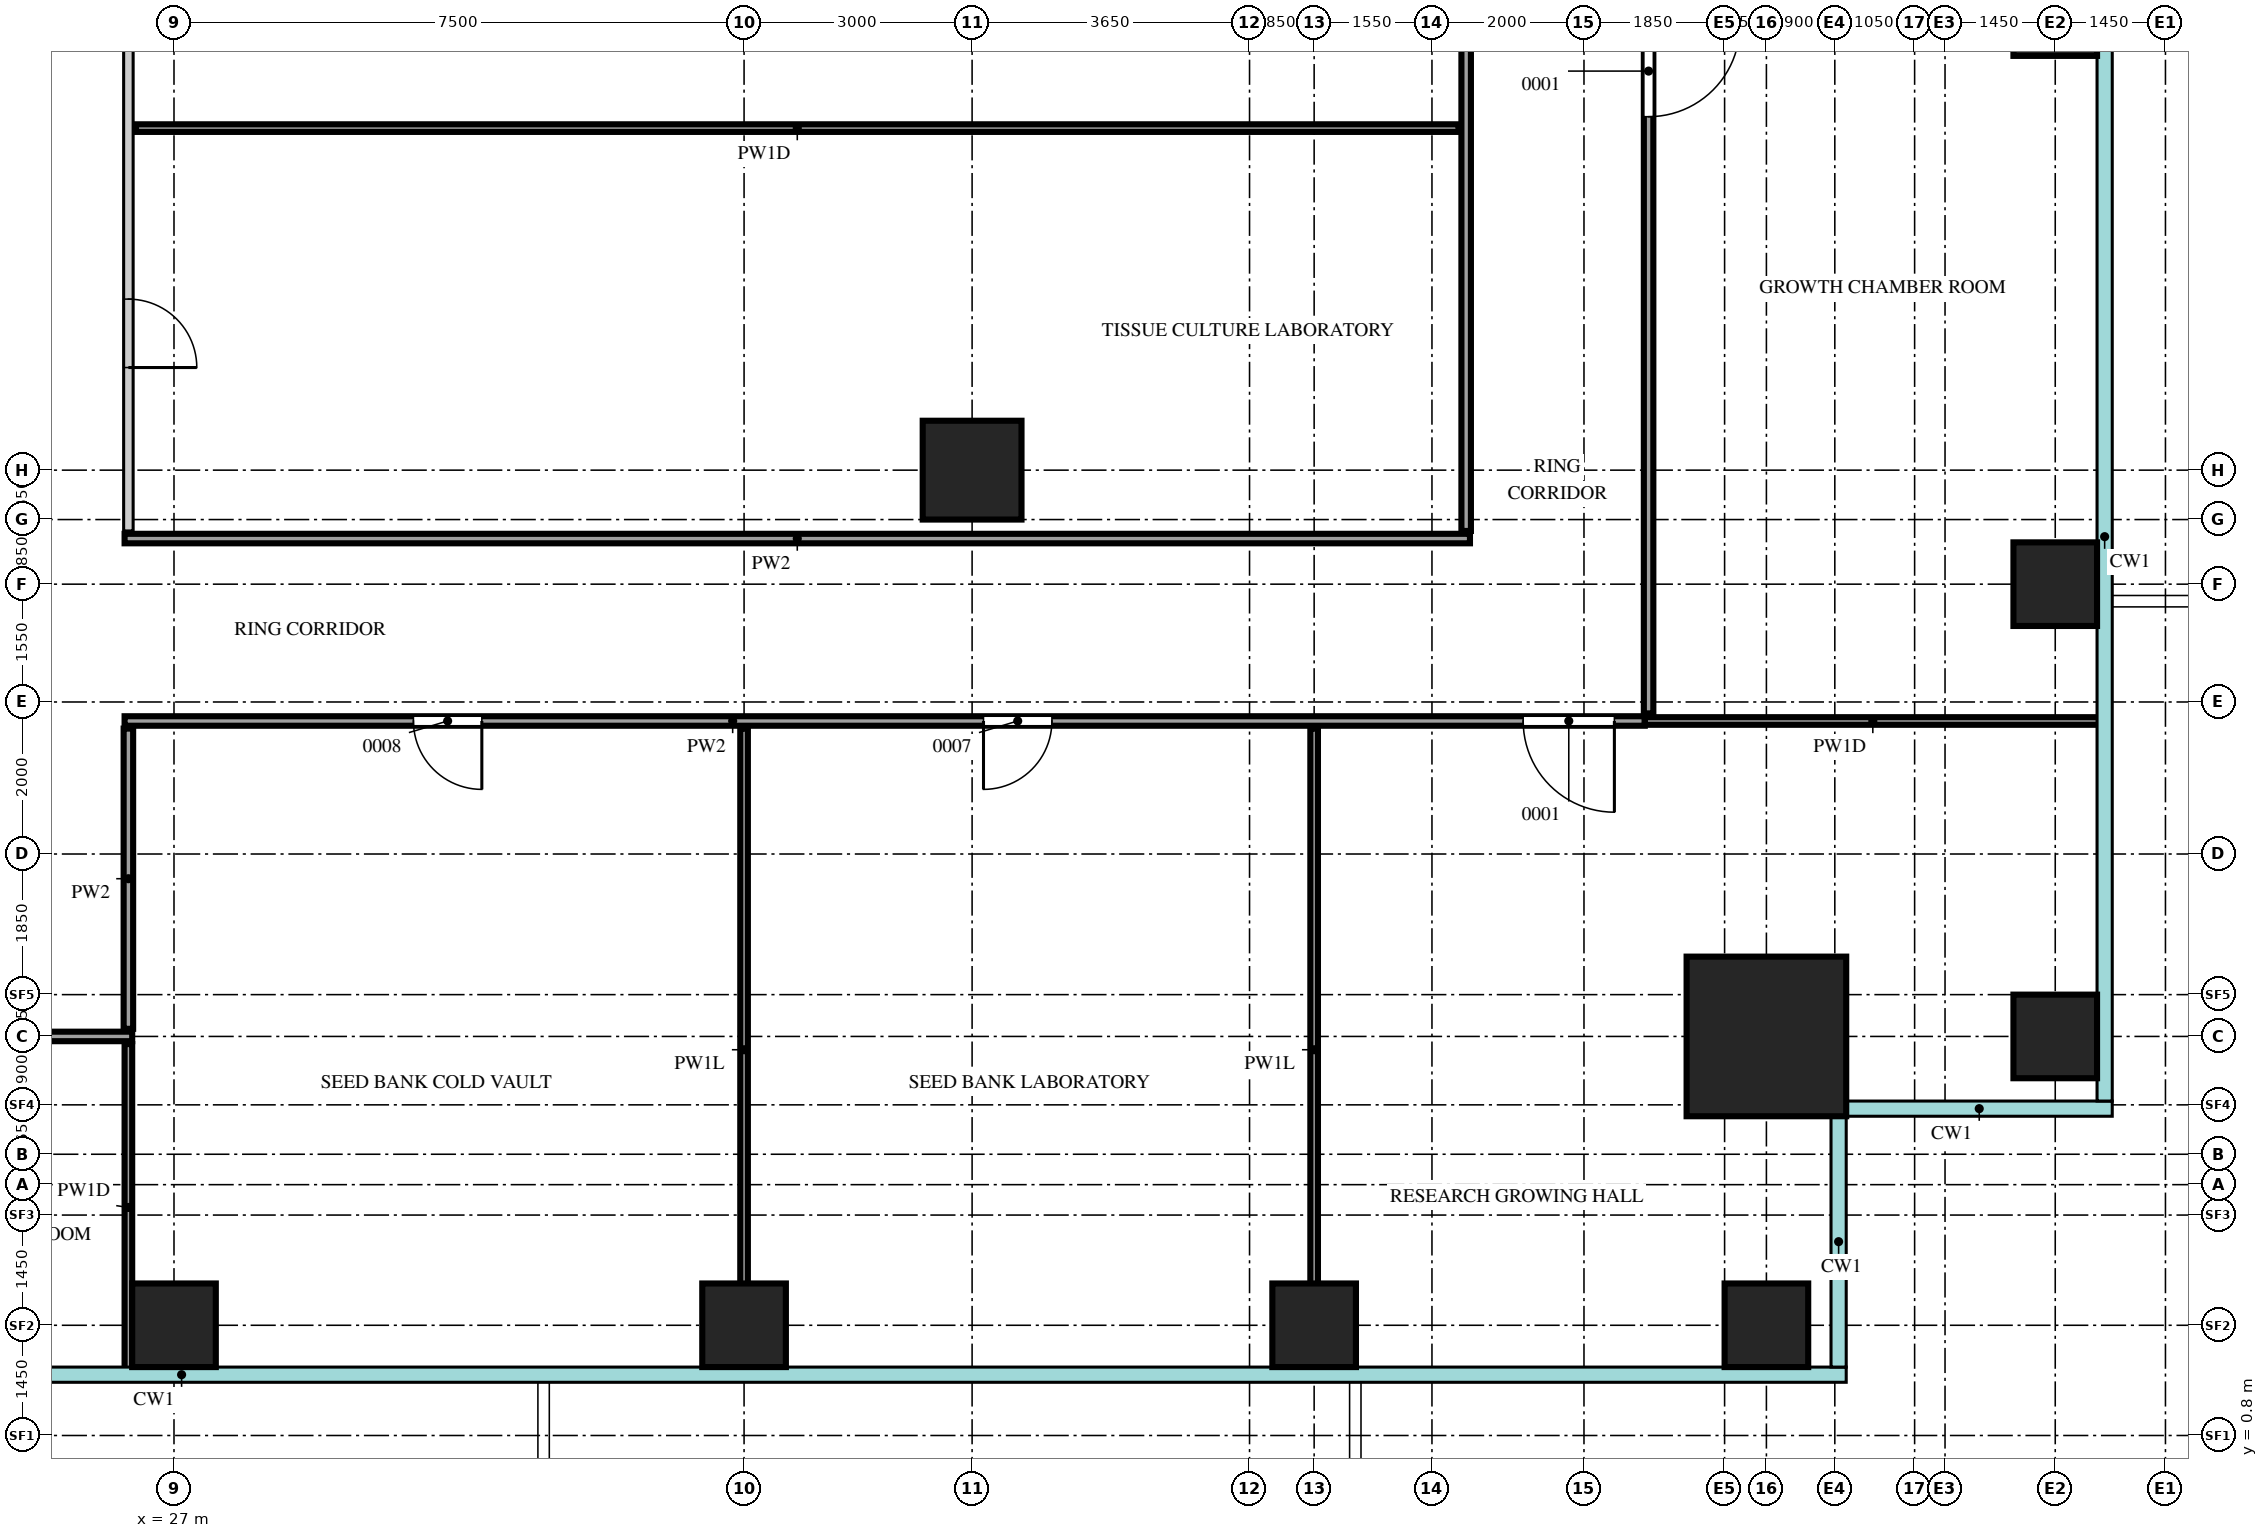
"""IFC4 building model, lengths in metres.
Left out: names, types, materials, properties, quantities, classifications, styles, units other than length and angle.
Written with IfcOpenShell. Run it as: python <this file> out.ifc"""

import sys

from ifc_helpers import new_model, si_unit, direction, frame, frame_2d, origin, origin_2d, place, context, subcontext, project, spatial, rectangle, extrude, source, transform, mapped, element, fill, save


model = new_model("IFC4")
c1 = context("Model", 3, precision=1e-05, world=origin(), true_north=direction((0.0, 1.0)))
c2 = subcontext(c1, "Body", "Model", "MODEL_VIEW")
j1 = project(units=[si_unit("LENGTHUNIT", "METRE"), si_unit("PLANEANGLEUNIT", "RADIAN")], contexts=[c1])
p1 = place(None, origin())
s1 = spatial("IfcSite", under=j1, at=p1, CompositionType="ELEMENT")
p2 = place(p1, origin())
s2 = spatial("IfcBuilding", under=s1, at=p2, CompositionType="ELEMENT")
p3 = place(p2, frame((0.0, 0.0, 105.9)))
s3 = spatial("IfcBuildingStorey", under=s2, at=p3, CompositionType="ELEMENT", Elevation=105.9)
m1 = source(origin(), c2, "Body", "SweptSolid", [
    extrude(rectangle(XDim=2.1, YDim=2.1, at=origin_2d()), origin(), (0.0, 0.0, 1.0), 4.4),
])
p4 = place(p3, frame((47.95, 6.05, 0.0), z_axis=(0.0, 0.0, 1.0), x_axis=(1.0, 0.0, 0.0)))
e1 = element("IfcColumn", 1, at=p4, inside=s3, PredefinedType="COLUMN", context=c2, shape_type="MappedRepresentation", body=[
    mapped(m1, transform((0.0, 0.0, 0.0))),
])
m2 = source(origin(), c2, "Body", "SweptSolid", [
    extrude(rectangle(XDim=1.1, YDim=1.1, at=origin_2d()), origin(), (0.0, 0.0, 1.0), 4.1),
])
for number, where, z_axis, x_axis in (
    (2, (27.0, 2.25, 0.0), (0.0, 0.0, 1.0), (1.0, 0.0, 0.0)),
    (3, (34.5, 2.25, 0.0), (0.0, 0.0, 1.0), (1.0, 0.0, 0.0)),
    (4, (42.0, 2.25, 0.0), (0.0, 0.0, 1.0), (1.0, 0.0, 0.0)),
    (5, (47.95, 2.25, 0.0), (0.0, 0.0, 1.0), (1.0, 0.0, 0.0)),
    (6, (51.75, 6.05, 0.0), (0.0, 0.0, 1.0), (1.0, 0.0, 0.0)),
    (7, (51.75, 12.0, 0.0), (0.0, 0.0, 1.0), (1.0, 0.0, 0.0)),
    (8, (51.75, 19.5, 0.0), (0.0, 0.0, 1.0), (1.0, 0.0, 0.0)),
):
    element("IfcColumn", number, at=place(p3, frame(where, z_axis=z_axis, x_axis=x_axis)), inside=s3, PredefinedType="COLUMN", context=c2, shape_type="MappedRepresentation", body=[
        mapped(m2, transform((0.0, 0.0, 0.0))),
    ])
m3 = source(origin(), c2, "Body", "SweptSolid", [
    extrude(rectangle(XDim=1.3, YDim=1.3, at=origin_2d()), origin(), (0.0, 0.0, 1.0), 4.1),
])
p5 = place(p3, frame((37.5, 13.5, 0.0), z_axis=(0.0, 0.0, 1.0), x_axis=(1.0, 0.0, 0.0)))
e9 = element("IfcColumn", 9, at=p5, inside=s3, PredefinedType="COLUMN", context=c2, shape_type="MappedRepresentation", body=[
    mapped(m3, transform((0.0, 0.0, 0.0))),
])
m4 = source(origin(), c2, "Body", "SweptSolid", [
    extrude(rectangle(XDim=4.3, YDim=0.1, at=frame_2d((2.15, 0.0))), origin(), (0.0, 0.0, 1.0), 4.2),
])
p6 = place(p3, frame((26.4, 1.65, 0.0), z_axis=(0.0, 0.0, 1.0), x_axis=(0.0, 1.0, 0.0)))
e10 = element("IfcWall", 10, at=p6, inside=s3, PredefinedType="PARTITIONING", context=c2, shape_type="MappedRepresentation", body=[
    mapped(m4, transform((0.0, 0.0, 0.0))),
])
m5 = source(origin(), c2, "Body", "SweptSolid", [
    extrude(rectangle(XDim=8.45, YDim=0.1, at=frame_2d((4.225, 0.0))), origin(), (0.0, 0.0, 1.0), 3.6),
])
for number, where, z_axis, x_axis in (
    (11, (34.5, 1.65, 0.0), (0.0, 0.0, 1.0), (0.0, 1.0, 0.0)),
    (12, (42.0, 1.65, 0.0), (0.0, 0.0, 1.0), (0.0, 1.0, 0.0)),
):
    element("IfcWall", number, at=place(p3, frame(where, z_axis=z_axis, x_axis=x_axis)), inside=s3, PredefinedType="PARTITIONING", context=c2, shape_type="MappedRepresentation", body=[
        mapped(m5, transform((0.0, 0.0, 0.0))),
    ])
m6 = source(origin(), c2, "Body", "SweptSolid", [
    extrude(rectangle(XDim=22.3, YDim=0.125, at=frame_2d((11.15, 0.0))), origin(), (0.0, 0.0, 1.0), 3.55),
])
p7 = place(p3, frame((4.15, 6.05, 0.0), z_axis=(0.0, 0.0, 1.0), x_axis=(1.0, 0.0, 0.0)))
e13 = element("IfcWall", 13, at=p7, inside=s3, PredefinedType="PARTITIONING", context=c2, shape_type="MappedRepresentation", body=[
    mapped(m6, transform((0.0, 0.0, 0.0))),
])
m7 = source(origin(), c2, "Body", "SweptSolid", [
    extrude(rectangle(XDim=0.9, YDim=2.1, at=frame_2d((0.45, 1.05))), frame((0.0, 0.073, 0.0), z_axis=(0.0, -1.0, 0.0), x_axis=(1.0, 0.0, 0.0)), (0.0, 0.0, 1.0), 0.145),
])
p8 = place(p7, frame((3.5, 0.0, 0.0)))
e14 = element("IfcOpeningElement", 14, at=p8, cuts=e13, PredefinedType="OPENING", context=c2, shape_type="MappedRepresentation", body=[
    mapped(m7, transform((0.0, 0.0, 0.0))),
])
p9 = place(p7, frame((11.0, 0.0, 0.0)))
e15 = element("IfcOpeningElement", 15, at=p9, cuts=e13, PredefinedType="OPENING", context=c2, shape_type="MappedRepresentation", body=[
    mapped(m7, transform((0.0, 0.0, 0.0))),
])
p10 = place(p7, frame((18.35, 0.0, 0.0)))
e16 = element("IfcOpeningElement", 16, at=p10, cuts=e13, PredefinedType="OPENING", context=c2, shape_type="MappedRepresentation", body=[
    mapped(m7, transform((0.0, 0.0, 0.0))),
])
m8 = source(origin(), c2, "Body", "SweptSolid", [
    extrude(rectangle(XDim=3.95, YDim=0.125, at=frame_2d((1.975, 0.0))), origin(), (0.0, 0.0, 1.0), 4.2),
])
p11 = place(p3, frame((26.4, 6.15, 0.0), z_axis=(0.0, 0.0, 1.0), x_axis=(0.0, 1.0, 0.0)))
e17 = element("IfcWall", 17, at=p11, inside=s3, PredefinedType="PARTITIONING", context=c2, shape_type="MappedRepresentation", body=[
    mapped(m8, transform((0.0, 0.0, 0.0))),
])
m9 = source(origin(), c2, "Body", "SweptSolid", [
    extrude(rectangle(XDim=20.0, YDim=0.125, at=frame_2d((10.0, 0.0))), origin(), (0.0, 0.0, 1.0), 4.2),
])
p12 = place(p3, frame((26.35, 10.2, 0.0), z_axis=(0.0, 0.0, 1.0), x_axis=(1.0, 0.0, 0.0)))
e18 = element("IfcWall", 18, at=p12, inside=s3, PredefinedType="PARTITIONING", context=c2, shape_type="MappedRepresentation", body=[
    mapped(m9, transform((0.0, 0.0, 0.0))),
])
p13 = place(p12, frame((3.8, 0.0, 0.0)))
e19 = element("IfcOpeningElement", 19, at=p13, cuts=e18, PredefinedType="OPENING", context=c2, shape_type="MappedRepresentation", body=[
    mapped(m7, transform((0.0, 0.0, 0.0))),
])
p14 = place(p12, frame((11.3, 0.0, 0.0)))
e20 = element("IfcOpeningElement", 20, at=p14, cuts=e18, PredefinedType="OPENING", context=c2, shape_type="MappedRepresentation", body=[
    mapped(m7, transform((0.0, 0.0, 0.0))),
])
m10 = source(origin(), c2, "Body", "SweptSolid", [
    extrude(rectangle(XDim=1.2, YDim=2.1, at=frame_2d((0.6, 1.05))), frame((0.0, 0.073, 0.0), z_axis=(0.0, -1.0, 0.0), x_axis=(1.0, 0.0, 0.0)), (0.0, 0.0, 1.0), 0.145),
])
p15 = place(p12, frame((18.4, 0.0, 0.0)))
e21 = element("IfcOpeningElement", 21, at=p15, cuts=e18, PredefinedType="OPENING", context=c2, shape_type="MappedRepresentation", body=[
    mapped(m10, transform((0.0, 0.0, 0.0))),
])
m11 = source(origin(), c2, "Body", "SweptSolid", [
    extrude(rectangle(XDim=6.0, YDim=0.1, at=frame_2d((3.0, 0.0))), origin(), (0.0, 0.0, 1.0), 4.2),
])
p16 = place(p3, frame((46.35, 10.2, 0.0), z_axis=(0.0, 0.0, 1.0), x_axis=(1.0, 0.0, 0.0)))
e22 = element("IfcWall", 22, at=p16, inside=s3, PredefinedType="PARTITIONING", context=c2, shape_type="MappedRepresentation", body=[
    mapped(m11, transform((0.0, 0.0, 0.0))),
])
m12 = source(origin(), c2, "Body", "SweptSolid", [
    extrude(rectangle(XDim=37.65, YDim=0.125, at=frame_2d((18.825, 0.0))), origin(), (0.0, 0.0, 1.0), 4.2),
])
p17 = place(p3, frame((46.4, 10.3, 0.0), z_axis=(0.0, 0.0, 1.0), x_axis=(0.0, 1.0, 0.0)))
e23 = element("IfcWall", 23, at=p17, inside=s3, PredefinedType="PARTITIONING", context=c2, shape_type="MappedRepresentation", body=[
    mapped(m12, transform((0.0, 0.0, 0.0))),
])
p18 = place(p17, frame((7.85, 0.0, 0.0)))
e24 = element("IfcOpeningElement", 24, at=p18, cuts=e23, PredefinedType="OPENING", context=c2, shape_type="MappedRepresentation", body=[
    mapped(m10, transform((0.0, 0.0, 0.0))),
])
p19 = place(p17, frame((23.6, 0.0, 0.0)))
e25 = element("IfcOpeningElement", 25, at=p19, cuts=e23, PredefinedType="OPENING", context=c2, shape_type="MappedRepresentation", body=[
    mapped(m10, transform((0.0, 0.0, 0.0))),
])
p20 = place(p17, frame((32.9, 0.0, 0.0)))
e26 = element("IfcOpeningElement", 26, at=p20, cuts=e23, PredefinedType="OPENING", context=c2, shape_type="MappedRepresentation", body=[
    mapped(m10, transform((0.0, 0.0, 0.0))),
])
m13 = source(origin(), c2, "Body", "SweptSolid", [
    extrude(rectangle(XDim=17.7, YDim=0.125, at=frame_2d((8.85, 0.0))), origin(), (0.0, 0.0, 1.0), 4.2),
])
p21 = place(p3, frame((26.35, 12.6, 0.0), z_axis=(0.0, 0.0, 1.0), x_axis=(1.0, 0.0, 0.0)))
e27 = element("IfcWall", 27, at=p21, inside=s3, PredefinedType="PARTITIONING", context=c2, shape_type="MappedRepresentation", body=[
    mapped(m13, transform((0.0, 0.0, 0.0))),
])
m14 = source(origin(), c2, "Body", "SweptSolid", [
    extrude(rectangle(XDim=23.2, YDim=0.125, at=frame_2d((11.6, 0.0))), origin(), (0.0, 0.0, 1.0), 4.2),
])
p22 = place(p3, frame((26.4, 12.7, 0.0), z_axis=(0.0, 0.0, 1.0), x_axis=(0.0, 1.0, 0.0)))
e28 = element("IfcWall", 28, at=p22, inside=s3, PredefinedType="PARTITIONING", context=c2, shape_type="MappedRepresentation", body=[
    mapped(m14, transform((0.0, 0.0, 0.0))),
])
p23 = place(p22, frame((2.15, 0.0, 0.0)))
e29 = element("IfcOpeningElement", 29, at=p23, cuts=e28, PredefinedType="OPENING", context=c2, shape_type="MappedRepresentation", body=[
    mapped(m7, transform((0.0, 0.0, 0.0))),
])
p24 = place(p22, frame((18.2, 0.0, 0.0)))
e30 = element("IfcOpeningElement", 30, at=p24, cuts=e28, PredefinedType="OPENING", context=c2, shape_type="MappedRepresentation", body=[
    mapped(m10, transform((0.0, 0.0, 0.0))),
])
m15 = source(origin(), c2, "Body", "SweptSolid", [
    extrude(rectangle(XDim=32.85, YDim=0.125, at=frame_2d((16.425, 0.0))), origin(), (0.0, 0.0, 1.0), 4.2),
])
p25 = place(p3, frame((44.0, 12.7, 0.0), z_axis=(0.0, 0.0, 1.0), x_axis=(0.0, 1.0, 0.0)))
e31 = element("IfcWall", 31, at=p25, inside=s3, PredefinedType="PARTITIONING", context=c2, shape_type="MappedRepresentation", body=[
    mapped(m15, transform((0.0, 0.0, 0.0))),
])
p26 = place(p25, frame((9.2, 0.0, 0.0)))
e32 = element("IfcOpeningElement", 32, at=p26, cuts=e31, PredefinedType="OPENING", context=c2, shape_type="MappedRepresentation", body=[
    mapped(m10, transform((0.0, 0.0, 0.0))),
])
p27 = place(p25, frame((27.5, 0.0, 0.0)))
e33 = element("IfcOpeningElement", 33, at=p27, cuts=e31, PredefinedType="OPENING", context=c2, shape_type="MappedRepresentation", body=[
    mapped(m10, transform((0.0, 0.0, 0.0))),
])
m16 = source(origin(), c2, "Body", "SweptSolid", [
    extrude(rectangle(XDim=17.4, YDim=0.1, at=frame_2d((8.7, 0.0))), origin(), (0.0, 0.0, 1.0), 4.2),
])
p28 = place(p3, frame((26.5, 18.0, 0.0), z_axis=(0.0, 0.0, 1.0), x_axis=(1.0, 0.0, 0.0)))
e34 = element("IfcWall", 34, at=p28, inside=s3, PredefinedType="PARTITIONING", context=c2, shape_type="MappedRepresentation", body=[
    mapped(m16, transform((0.0, 0.0, 0.0))),
])
m17 = source(origin(), c2, "Body", "SweptSolid", [
    extrude(rectangle(XDim=0.9, YDim=2.1, at=frame_2d((0.45, 1.05))), frame((0.0, 0.025, 0.0), z_axis=(0.0, -1.0, 0.0), x_axis=(1.0, 0.0, 0.0)), (0.0, 0.0, 1.0), 0.05),
])
p29 = place(p13, origin())
e35 = element("IfcDoor", 35, at=p29, inside=s3, OperationType="SINGLE_SWING_RIGHT", PredefinedType="DOOR", context=c2, shape_type="MappedRepresentation", body=[
    mapped(m17, transform((0.0, 0.0, 0.0))),
])
fill(e19, e35)
p30 = place(p14, origin())
e36 = element("IfcDoor", 36, at=p30, inside=s3, OperationType="SINGLE_SWING_LEFT", PredefinedType="DOOR", context=c2, shape_type="MappedRepresentation", body=[
    mapped(m17, transform((0.0, 0.0, 0.0))),
])
fill(e20, e36)
m18 = source(origin(), c2, "Body", "SweptSolid", [
    extrude(rectangle(XDim=1.2, YDim=2.1, at=frame_2d((0.6, 1.05))), frame((0.0, 0.025, 0.0), z_axis=(0.0, -1.0, 0.0), x_axis=(1.0, 0.0, 0.0)), (0.0, 0.0, 1.0), 0.05),
])
p31 = place(p15, origin())
e37 = element("IfcDoor", 37, at=p31, inside=s3, OperationType="SINGLE_SWING_RIGHT", PredefinedType="DOOR", context=c2, shape_type="MappedRepresentation", body=[
    mapped(m18, transform((0.0, 0.0, 0.0))),
])
fill(e21, e37)
p32 = place(p23, origin())
e38 = element("IfcDoor", 38, at=p32, inside=s3, OperationType="SINGLE_SWING_LEFT", PredefinedType="DOOR", context=c2, shape_type="MappedRepresentation", body=[
    mapped(m17, transform((0.0, 0.0, 0.0))),
])
fill(e29, e38)
p33 = place(p18, origin())
e39 = element("IfcDoor", 39, at=p33, inside=s3, OperationType="SINGLE_SWING_RIGHT", PredefinedType="DOOR", context=c2, shape_type="MappedRepresentation", body=[
    mapped(m18, transform((0.0, 0.0, 0.0))),
])
fill(e24, e39)
save(model, sys.argv[1])
